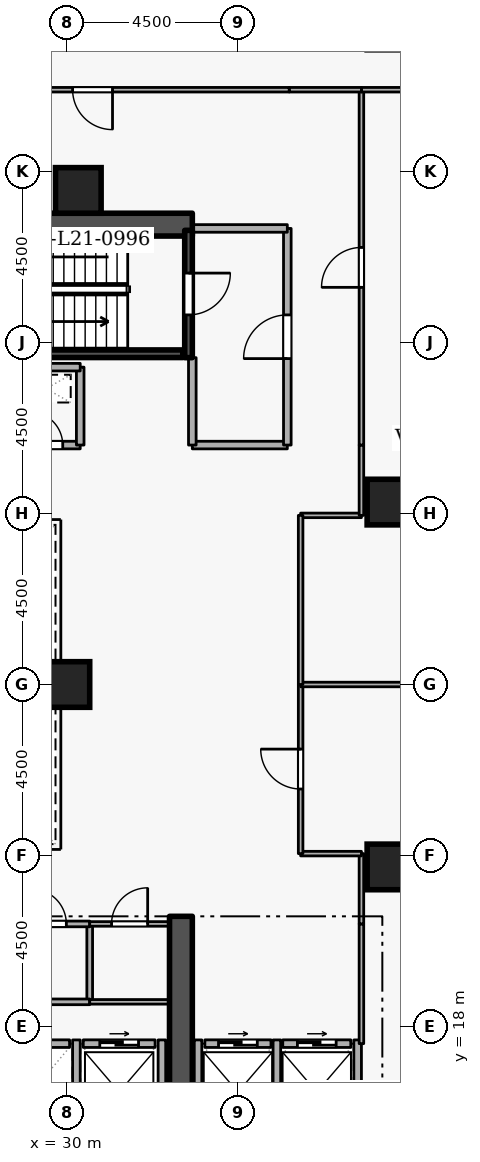
"""IFC4 building model, lengths in metres.
Left out: names, types, materials, properties, quantities, classifications, styles, units other than length and angle.
Written with IfcOpenShell. Run it as: python <this file> out.ifc"""

import sys

from ifc_helpers import new_model, si_unit, direction, frame, frame_2d, origin, origin_2d, place, context, subcontext, project, spatial, rectangle, extrude, element, fill, save


model = new_model("IFC4")
c1 = context("Model", 3, precision=1e-05, world=origin(), true_north=direction((0.0, 1.0)))
c2 = subcontext(c1, "Body", "Model", "MODEL_VIEW")
j1 = project(units=[si_unit("LENGTHUNIT", "METRE"), si_unit("PLANEANGLEUNIT", "RADIAN")], contexts=[c1])
p1 = place(None, origin())
s1 = spatial("IfcSite", under=j1, at=p1, CompositionType="ELEMENT")
p2 = place(p1, origin())
s2 = spatial("IfcBuilding", under=s1, at=p2, CompositionType="ELEMENT")
p3 = place(p2, frame((0.0, 0.0, 83.7)))
s3 = spatial("IfcBuildingStorey", under=s2, at=p3, CompositionType="ELEMENT", Elevation=83.7)
p4 = place(p3, frame((33.0, 15.2, 0.0), z_axis=(0.0, 0.0, 1.0), x_axis=(0.0, 1.0, 0.0)))
e1 = element("IfcWall", 1, at=p4, inside=s3, PredefinedType="SHEAR", context=c2, shape_type="SweptSolid", body=[
    extrude(rectangle(XDim=5.7, YDim=0.6, at=frame_2d((2.85, 0.0))), origin(), (0.0, 0.0, 1.0), 3.6),
])
p5 = place(p3, frame((17.7, 39.1, 0.0), z_axis=(0.0, 0.0, 1.0), x_axis=(1.0, 0.0, 0.0)))
e2 = element("IfcWall", 2, at=p5, inside=s3, PredefinedType="SHEAR", context=c2, shape_type="SweptSolid", body=[
    extrude(rectangle(XDim=15.6, YDim=0.6, at=frame_2d((7.8, 0.0))), origin(), (0.0, 0.0, 1.0), 3.6),
])
for number, where, z_axis, x_axis in (
    (3, (38.5, 22.2, 0.0), (0.0, 0.0, 1.0), (1.0, 0.0, 0.0)),
    (4, (38.5, 31.8, 0.0), (0.0, 0.0, 1.0), (1.0, 0.0, 0.0)),
    (5, (30.3, 40.0, 0.0), (0.0, 0.0, 1.0), (1.0, 0.0, 0.0)),
    (6, (30.0, 27.0, 0.0), (0.0, 0.0, 1.0), (1.0, 0.0, 0.0)),
):
    element("IfcColumn", number, at=place(p3, frame(where, z_axis=z_axis, x_axis=x_axis)), inside=s3, PredefinedType="COLUMN", context=c2, shape_type="SweptSolid", body=[
        extrude(rectangle(XDim=1.2, YDim=1.2, at=origin_2d()), origin(), (0.0, 0.0, 1.0), 3.6),
    ])
p6 = place(p3, frame((28.08, 17.55, 0.0), z_axis=(0.0, 0.0, 1.0), x_axis=(1.0, 0.0, 0.0)))
e7 = element("IfcWall", 7, at=p6, inside=s3, PredefinedType="STANDARD", context=c2, shape_type="SweptSolid", body=[
    extrude(rectangle(XDim=1.99, YDim=0.2, at=frame_2d((0.995, 0.0))), origin(), (0.0, 0.0, 1.0), 3.34),
])
p7 = place(p3, frame((30.43, 17.55, 0.0), z_axis=(0.0, 0.0, 1.0), x_axis=(1.0, 0.0, 0.0)))
e8 = element("IfcWall", 8, at=p7, inside=s3, PredefinedType="STANDARD", context=c2, shape_type="SweptSolid", body=[
    extrude(rectangle(XDim=1.89, YDim=0.2, at=frame_2d((0.945, 0.0))), origin(), (0.0, 0.0, 1.0), 3.34),
])
p8 = place(p7, frame((0.435, 0.0, 0.0)))
e9 = element("IfcOpeningElement", 9, at=p8, cuts=e8, PredefinedType="OPENING", context=c2, shape_type="SweptSolid", body=[
    extrude(rectangle(XDim=1.02, YDim=2.06, at=frame_2d((0.51, 1.03))), frame((0.0, 0.11, 0.0), z_axis=(0.0, -1.0, 0.0), x_axis=(1.0, 0.0, 0.0)), (0.0, 0.0, 1.0), 0.22),
])
p9 = place(p3, frame((33.63, 17.55, 0.0), z_axis=(0.0, 0.0, 1.0), x_axis=(1.0, 0.0, 0.0)))
e10 = element("IfcWall", 10, at=p9, inside=s3, PredefinedType="STANDARD", context=c2, shape_type="SweptSolid", body=[
    extrude(rectangle(XDim=1.74, YDim=0.2, at=frame_2d((0.87, 0.0))), origin(), (0.0, 0.0, 1.0), 3.34),
])
p10 = place(p9, frame((0.36, 0.0, 0.0)))
e11 = element("IfcOpeningElement", 11, at=p10, cuts=e10, PredefinedType="OPENING", context=c2, shape_type="SweptSolid", body=[
    extrude(rectangle(XDim=1.02, YDim=2.06, at=frame_2d((0.51, 1.03))), frame((0.0, 0.11, 0.0), z_axis=(0.0, -1.0, 0.0), x_axis=(1.0, 0.0, 0.0)), (0.0, 0.0, 1.0), 0.22),
])
p11 = place(p3, frame((35.68, 17.55, 0.0), z_axis=(0.0, 0.0, 1.0), x_axis=(1.0, 0.0, 0.0)))
e12 = element("IfcWall", 12, at=p11, inside=s3, PredefinedType="STANDARD", context=c2, shape_type="SweptSolid", body=[
    extrude(rectangle(XDim=1.79, YDim=0.2, at=frame_2d((0.895, 0.0))), origin(), (0.0, 0.0, 1.0), 3.34),
])
p12 = place(p11, frame((0.385, 0.0, 0.0)))
e13 = element("IfcOpeningElement", 13, at=p12, cuts=e12, PredefinedType="OPENING", context=c2, shape_type="SweptSolid", body=[
    extrude(rectangle(XDim=1.02, YDim=2.06, at=frame_2d((0.51, 1.03))), frame((0.0, 0.11, 0.0), z_axis=(0.0, -1.0, 0.0), x_axis=(1.0, 0.0, 0.0)), (0.0, 0.0, 1.0), 0.22),
])
for number, where, z_axis, x_axis in (
    (14, (30.25, 15.212, 0.0), (0.0, 0.0, 1.0), (0.0, 1.0, 0.0)),
    (15, (32.5, 15.212, 0.0), (0.0, 0.0, 1.0), (0.0, 1.0, 0.0)),
):
    element("IfcWall", number, at=place(p3, frame(where, z_axis=z_axis, x_axis=x_axis)), inside=s3, PredefinedType="STANDARD", context=c2, shape_type="SweptSolid", body=[
        extrude(rectangle(XDim=2.436, YDim=0.2, at=frame_2d((1.218, 0.0))), origin(), (0.0, 0.0, 1.0), 3.34),
    ])
for number, where, z_axis, x_axis in (
    (16, (35.525, 15.012, 0.0), (0.0, 0.0, 1.0), (0.0, 1.0, 0.0)),
    (17, (33.45, 15.012, 0.0), (0.0, 0.0, 1.0), (0.0, 1.0, 0.0)),
    (18, (37.65, 15.012, 0.0), (0.0, 0.0, 1.0), (0.0, 1.0, 0.0)),
):
    element("IfcWall", number, at=place(p3, frame(where, z_axis=z_axis, x_axis=x_axis)), inside=s3, PredefinedType="STANDARD", context=c2, shape_type="SweptSolid", body=[
        extrude(rectangle(XDim=2.636, YDim=0.2, at=frame_2d((1.318, 0.0))), origin(), (0.0, 0.0, 1.0), 3.34),
    ])
p13 = place(p3, frame((33.2, 38.95, 0.0), z_axis=(0.0, 0.0, 1.0), x_axis=(0.0, -1.0, 0.0)))
e19 = element("IfcWall", 19, at=p13, inside=s3, PredefinedType="SHEAR", context=c2, shape_type="SweptSolid", body=[
    extrude(rectangle(XDim=3.35, YDim=0.2, at=frame_2d((1.675, 0.0))), origin(), (0.0, 0.0, 1.0), 3.6),
])
p14 = place(p13, frame((1.125, 0.0, 0.0)))
e20 = element("IfcOpeningElement", 20, at=p14, cuts=e19, PredefinedType="OPENING", context=c2, shape_type="SweptSolid", body=[
    extrude(rectangle(XDim=1.1, YDim=2.1, at=frame_2d((0.55, 1.05))), frame((0.0, 0.11, 0.0), z_axis=(0.0, -1.0, 0.0), x_axis=(1.0, 0.0, 0.0)), (0.0, 0.0, 1.0), 0.22),
])
p15 = place(p3, frame((25.95, 35.703, 0.0), z_axis=(0.0, 0.0, 1.0), x_axis=(1.0, 0.0, 0.0)))
e21 = element("IfcWall", 21, at=p15, inside=s3, PredefinedType="SHEAR", context=c2, shape_type="SweptSolid", body=[
    extrude(rectangle(XDim=7.1, YDim=0.2, at=frame_2d((3.55, 0.0))), origin(), (0.0, 0.0, 1.0), 3.6),
])
p16 = place(p3, frame((33.3, 33.3, 0.0), z_axis=(0.0, 0.0, 1.0), x_axis=(1.0, 0.0, 0.0)))
e22 = element("IfcWall", 22, at=p16, inside=s3, PredefinedType="STANDARD", context=c2, shape_type="SweptSolid", body=[
    extrude(rectangle(XDim=2.5, YDim=0.2, at=frame_2d((1.25, 0.0))), origin(), (0.0, 0.0, 1.0), 3.34),
])
p17 = place(p3, frame((35.8, 33.3, 0.0), z_axis=(0.0, 0.0, 1.0), x_axis=(0.0, 1.0, 0.0)))
e23 = element("IfcWall", 23, at=p17, inside=s3, PredefinedType="STANDARD", context=c2, shape_type="SweptSolid", body=[
    extrude(rectangle(XDim=5.7, YDim=0.2, at=frame_2d((2.85, 0.0))), origin(), (0.0, 0.0, 1.0), 3.34),
])
p18 = place(p17, frame((2.275, 0.0, 0.0)))
e24 = element("IfcOpeningElement", 24, at=p18, cuts=e23, PredefinedType="OPENING", context=c2, shape_type="SweptSolid", body=[
    extrude(rectangle(XDim=1.15, YDim=2.1, at=frame_2d((0.575, 1.05))), frame((0.0, 0.11, 0.0), z_axis=(0.0, -1.0, 0.0), x_axis=(1.0, 0.0, 0.0)), (0.0, 0.0, 1.0), 0.22),
])
p19 = place(p3, frame((35.8, 39.0, 0.0), z_axis=(0.0, 0.0, 1.0), x_axis=(-1.0, 0.0, 0.0)))
e25 = element("IfcWall", 25, at=p19, inside=s3, PredefinedType="STANDARD", context=c2, shape_type="SweptSolid", body=[
    extrude(rectangle(XDim=2.5, YDim=0.2, at=frame_2d((1.25, 0.0))), origin(), (0.0, 0.0, 1.0), 3.34),
])
p20 = place(p3, frame((33.3, 35.6, 0.0), z_axis=(0.0, 0.0, 1.0), x_axis=(0.0, -1.0, 0.0)))
e26 = element("IfcWall", 26, at=p20, inside=s3, PredefinedType="STANDARD", context=c2, shape_type="SweptSolid", body=[
    extrude(rectangle(XDim=2.3, YDim=0.2, at=frame_2d((1.15, 0.0))), origin(), (0.0, 0.0, 1.0), 2.545),
])
p21 = place(p3, frame((28.55, 33.3, 0.0), z_axis=(0.0, 0.0, 1.0), x_axis=(1.0, 0.0, 0.0)))
e27 = element("IfcWall", 27, at=p21, inside=s3, PredefinedType="STANDARD", context=c2, shape_type="SweptSolid", body=[
    extrude(rectangle(XDim=1.8, YDim=0.2, at=frame_2d((0.9, 0.0))), origin(), (0.0, 0.0, 1.0), 3.34),
])
p22 = place(p21, frame((0.46, 0.0, 0.0)))
e28 = element("IfcOpeningElement", 28, at=p22, cuts=e27, PredefinedType="OPENING", context=c2, shape_type="SweptSolid", body=[
    extrude(rectangle(XDim=0.88, YDim=2.04, at=frame_2d((0.44, 1.02))), frame((0.0, 0.11, 0.0), z_axis=(0.0, -1.0, 0.0), x_axis=(1.0, 0.0, 0.0)), (0.0, 0.0, 1.0), 0.22),
])
p23 = place(p3, frame((30.35, 33.3, 0.0), z_axis=(0.0, 0.0, 1.0), x_axis=(0.0, 1.0, 0.0)))
e29 = element("IfcWall", 29, at=p23, inside=s3, PredefinedType="STANDARD", context=c2, shape_type="SweptSolid", body=[
    extrude(rectangle(XDim=2.05, YDim=0.2, at=frame_2d((1.025, 0.0))), origin(), (0.0, 0.0, 1.0), 3.34),
])
p24 = place(p3, frame((30.35, 35.35, 0.0), z_axis=(0.0, 0.0, 1.0), x_axis=(-1.0, 0.0, 0.0)))
e30 = element("IfcWall", 30, at=p24, inside=s3, PredefinedType="STANDARD", context=c2, shape_type="SweptSolid", body=[
    extrude(rectangle(XDim=1.8, YDim=0.2, at=frame_2d((0.9, 0.0))), origin(), (0.0, 0.0, 1.0), 3.34),
])
p25 = place(p3, frame((30.6, 20.7, 0.0), z_axis=(0.0, 0.0, 1.0), x_axis=(0.0, -1.0, 0.0)))
e31 = element("IfcWall", 31, at=p25, inside=s3, PredefinedType="PARTITIONING", context=c2, shape_type="SweptSolid", body=[
    extrude(rectangle(XDim=2.05, YDim=0.15, at=frame_2d((1.025, 0.0))), origin(), (0.0, 0.0, 1.0), 3.34),
])
p26 = place(p3, frame((30.6, 18.65, 0.0), z_axis=(0.0, 0.0, 1.0), x_axis=(-1.0, 0.0, 0.0)))
e32 = element("IfcWall", 32, at=p26, inside=s3, PredefinedType="PARTITIONING", context=c2, shape_type="SweptSolid", body=[
    extrude(rectangle(XDim=2.15, YDim=0.15, at=frame_2d((1.075, 0.0))), origin(), (0.0, 0.0, 1.0), 3.34),
])
p27 = place(p3, frame((28.45, 20.7, 0.0), z_axis=(0.0, 0.0, 1.0), x_axis=(1.0, 0.0, 0.0)))
e33 = element("IfcWall", 33, at=p27, inside=s3, PredefinedType="PARTITIONING", context=c2, shape_type="SweptSolid", body=[
    extrude(rectangle(XDim=2.15, YDim=0.15, at=frame_2d((1.075, 0.0))), origin(), (0.0, 0.0, 1.0), 3.34),
])
p28 = place(p27, frame((0.615, 0.0, 0.0)))
e34 = element("IfcOpeningElement", 34, at=p28, cuts=e33, PredefinedType="OPENING", context=c2, shape_type="SweptSolid", body=[
    extrude(rectangle(XDim=0.92, YDim=2.08, at=frame_2d((0.46, 1.04))), frame((0.0, 0.085, 0.0), z_axis=(0.0, -1.0, 0.0), x_axis=(1.0, 0.0, 0.0)), (0.0, 0.0, 1.0), 0.17),
])
p29 = place(p3, frame((32.7, 18.65, 0.0), z_axis=(0.0, 0.0, 1.0), x_axis=(-1.0, 0.0, 0.0)))
e35 = element("IfcWall", 35, at=p29, inside=s3, PredefinedType="PARTITIONING", context=c2, shape_type="SweptSolid", body=[
    extrude(rectangle(XDim=2.1, YDim=0.12, at=frame_2d((1.05, 0.0))), origin(), (0.0, 0.0, 1.0), 3.34),
])
p30 = place(p3, frame((30.6, 20.7, 0.0), z_axis=(0.0, 0.0, 1.0), x_axis=(1.0, 0.0, 0.0)))
e36 = element("IfcWall", 36, at=p30, inside=s3, PredefinedType="PARTITIONING", context=c2, shape_type="SweptSolid", body=[
    extrude(rectangle(XDim=2.1, YDim=0.12, at=frame_2d((1.05, 0.0))), origin(), (0.0, 0.0, 1.0), 3.34),
])
p31 = place(p30, frame((0.575, 0.0, 0.0)))
e37 = element("IfcOpeningElement", 37, at=p31, cuts=e36, PredefinedType="OPENING", context=c2, shape_type="SweptSolid", body=[
    extrude(rectangle(XDim=0.95, YDim=2.1, at=frame_2d((0.475, 1.05))), frame((0.0, 0.07, 0.0), z_axis=(0.0, -1.0, 0.0), x_axis=(1.0, 0.0, 0.0)), (0.0, 0.0, 1.0), 0.14),
])
p32 = place(p3, frame((37.75, 17.55, 0.0), z_axis=(0.0, 0.0, 1.0), x_axis=(0.0, 1.0, 0.0)))
e38 = element("IfcWall", 38, at=p32, inside=s3, PredefinedType="PARTITIONING", context=c2, shape_type="SweptSolid", body=[
    extrude(rectangle(XDim=3.15, YDim=0.12, at=frame_2d((1.575, 0.0))), origin(), (0.0, 0.0, 1.0), 3.34),
])
p33 = place(p3, frame((37.75, 20.7, 0.0), z_axis=(0.0, 0.0, 1.0), x_axis=(0.0, 1.0, 0.0)))
e39 = element("IfcWall", 39, at=p33, inside=s3, PredefinedType="PARTITIONING", context=c2, shape_type="SweptSolid", body=[
    extrude(rectangle(XDim=1.85, YDim=0.12, at=frame_2d((0.925, 0.0))), origin(), (0.0, 0.0, 1.0), 3.34),
])
p34 = place(p3, frame((37.75, 22.55, 0.0), z_axis=(0.0, 0.0, 1.0), x_axis=(-1.0, 0.0, 0.0)))
e40 = element("IfcWall", 40, at=p34, inside=s3, PredefinedType="PARTITIONING", context=c2, shape_type="SweptSolid", body=[
    extrude(rectangle(XDim=1.6, YDim=0.12, at=frame_2d((0.8, 0.0))), origin(), (0.0, 0.0, 1.0), 3.34),
])
p35 = place(p3, frame((36.15, 22.55, 0.0), z_axis=(0.0, 0.0, 1.0), x_axis=(0.0, 1.0, 0.0)))
e41 = element("IfcWall", 41, at=p35, inside=s3, PredefinedType="PARTITIONING", context=c2, shape_type="SweptSolid", body=[
    extrude(rectangle(XDim=4.45, YDim=0.12, at=frame_2d((2.225, 0.0))), origin(), (0.0, 0.0, 1.0), 3.34),
])
p36 = place(p35, frame((1.7, 0.0, 0.0)))
e42 = element("IfcOpeningElement", 42, at=p36, cuts=e41, PredefinedType="OPENING", context=c2, shape_type="SweptSolid", body=[
    extrude(rectangle(XDim=1.05, YDim=2.1, at=frame_2d((0.525, 1.05))), frame((0.0, 0.07, 0.0), z_axis=(0.0, -1.0, 0.0), x_axis=(1.0, 0.0, 0.0)), (0.0, 0.0, 1.0), 0.14),
])
p37 = place(p3, frame((36.15, 27.0, 0.0), z_axis=(0.0, 0.0, 1.0), x_axis=(1.0, 0.0, 0.0)))
e43 = element("IfcWall", 43, at=p37, inside=s3, PredefinedType="PARTITIONING", context=c2, shape_type="SweptSolid", body=[
    extrude(rectangle(XDim=13.27, YDim=0.12, at=frame_2d((6.635, 0.0))), origin(), (0.0, 0.0, 1.0), 2.882),
])
p38 = place(p3, frame((36.15, 31.45, 0.0), z_axis=(0.0, 0.0, 1.0), x_axis=(1.0, 0.0, 0.0)))
e44 = element("IfcWall", 44, at=p38, inside=s3, PredefinedType="PARTITIONING", context=c2, shape_type="SweptSolid", body=[
    extrude(rectangle(XDim=1.6, YDim=0.12, at=frame_2d((0.8, 0.0))), origin(), (0.0, 0.0, 1.0), 3.34),
])
p39 = place(p3, frame((37.75, 31.45, 0.0), z_axis=(0.0, 0.0, 1.0), x_axis=(0.0, 1.0, 0.0)))
e45 = element("IfcWall", 45, at=p39, inside=s3, PredefinedType="PARTITIONING", context=c2, shape_type="SweptSolid", body=[
    extrude(rectangle(XDim=1.85, YDim=0.12, at=frame_2d((0.925, 0.0))), origin(), (0.0, 0.0, 1.0), 3.34),
])
p40 = place(p3, frame((37.75, 33.3, 0.0), z_axis=(0.0, 0.0, 1.0), x_axis=(0.0, 1.0, 0.0)))
e46 = element("IfcWall", 46, at=p40, inside=s3, PredefinedType="PARTITIONING", context=c2, shape_type="SweptSolid", body=[
    extrude(rectangle(XDim=9.35, YDim=0.12, at=frame_2d((4.675, 0.0))), origin(), (0.0, 0.0, 1.0), 3.34),
])
p41 = place(p40, frame((4.15, 0.0, 0.0)))
e47 = element("IfcOpeningElement", 47, at=p41, cuts=e46, PredefinedType="OPENING", context=c2, shape_type="SweptSolid", body=[
    extrude(rectangle(XDim=1.05, YDim=2.1, at=frame_2d((0.525, 1.05))), frame((0.0, 0.07, 0.0), z_axis=(0.0, -1.0, 0.0), x_axis=(1.0, 0.0, 0.0)), (0.0, 0.0, 1.0), 0.14),
])
p42 = place(p3, frame((37.75, 42.65, 0.0), z_axis=(0.0, 0.0, 1.0), x_axis=(1.0, 0.0, 0.0)))
e48 = element("IfcWall", 48, at=p42, inside=s3, PredefinedType="PARTITIONING", context=c2, shape_type="SweptSolid", body=[
    extrude(rectangle(XDim=11.67, YDim=0.12, at=frame_2d((5.835, 0.0))), origin(), (0.0, 0.0, 1.0), 3.34),
])
p43 = place(p3, frame((36.15, 27.0, 0.0), z_axis=(0.0, 0.0, 1.0), x_axis=(0.0, 1.0, 0.0)))
e49 = element("IfcWall", 49, at=p43, inside=s3, PredefinedType="PARTITIONING", context=c2, shape_type="SweptSolid", body=[
    extrude(rectangle(XDim=4.45, YDim=0.12, at=frame_2d((2.225, 0.0))), origin(), (0.0, 0.0, 1.0), 3.34),
])
p44 = place(p3, frame((37.75, 42.65, 0.0), z_axis=(0.0, 0.0, 1.0), x_axis=(-1.0, 0.0, 0.0)))
e50 = element("IfcWall", 50, at=p44, inside=s3, PredefinedType="PARTITIONING", context=c2, shape_type="SweptSolid", body=[
    extrude(rectangle(XDim=1.9, YDim=0.12, at=frame_2d((0.95, 0.0))), origin(), (0.0, 0.0, 1.0), 2.895),
])
p45 = place(p3, frame((35.85, 42.65, 0.0), z_axis=(0.0, 0.0, 1.0), x_axis=(-1.0, 0.0, 0.0)))
e51 = element("IfcWall", 51, at=p45, inside=s3, PredefinedType="PARTITIONING", context=c2, shape_type="SweptSolid", body=[
    extrude(rectangle(XDim=10.35, YDim=0.12, at=frame_2d((5.175, 0.0))), origin(), (0.0, 0.0, 1.0), 2.895),
])
p46 = place(p45, frame((4.65, 0.0, 0.0)))
e52 = element("IfcOpeningElement", 52, at=p46, cuts=e51, PredefinedType="OPENING", context=c2, shape_type="SweptSolid", body=[
    extrude(rectangle(XDim=1.05, YDim=2.1, at=frame_2d((0.525, 1.05))), frame((0.0, 0.07, 0.0), z_axis=(0.0, -1.0, 0.0), x_axis=(1.0, 0.0, 0.0)), (0.0, 0.0, 1.0), 0.14),
])
p47 = place(p8, origin())
e53 = element("IfcDoor", 53, at=p47, inside=s3, OperationType="SLIDING_TO_LEFT", PredefinedType="DOOR", context=c2, shape_type="SweptSolid", body=[
    extrude(rectangle(XDim=1.02, YDim=2.06, at=frame_2d((0.51, 1.03))), frame((0.0, 0.025, 0.0), z_axis=(0.0, -1.0, 0.0), x_axis=(1.0, 0.0, 0.0)), (0.0, 0.0, 1.0), 0.05),
])
fill(e9, e53)
p48 = place(p10, origin())
e54 = element("IfcDoor", 54, at=p48, inside=s3, OperationType="SLIDING_TO_LEFT", PredefinedType="DOOR", context=c2, shape_type="SweptSolid", body=[
    extrude(rectangle(XDim=1.02, YDim=2.06, at=frame_2d((0.51, 1.03))), frame((0.0, 0.025, 0.0), z_axis=(0.0, -1.0, 0.0), x_axis=(1.0, 0.0, 0.0)), (0.0, 0.0, 1.0), 0.05),
])
fill(e11, e54)
p49 = place(p12, origin())
e55 = element("IfcDoor", 55, at=p49, inside=s3, OperationType="SLIDING_TO_LEFT", PredefinedType="DOOR", context=c2, shape_type="SweptSolid", body=[
    extrude(rectangle(XDim=1.02, YDim=2.06, at=frame_2d((0.51, 1.03))), frame((0.0, 0.025, 0.0), z_axis=(0.0, -1.0, 0.0), x_axis=(1.0, 0.0, 0.0)), (0.0, 0.0, 1.0), 0.05),
])
fill(e13, e55)
p50 = place(p14, origin())
e56 = element("IfcDoor", 56, at=p50, inside=s3, OperationType="SINGLE_SWING_LEFT", PredefinedType="DOOR", context=c2, shape_type="SweptSolid", body=[
    extrude(rectangle(XDim=1.1, YDim=2.1, at=frame_2d((0.55, 1.05))), frame((0.0, 0.025, 0.0), z_axis=(0.0, -1.0, 0.0), x_axis=(1.0, 0.0, 0.0)), (0.0, 0.0, 1.0), 0.05),
])
fill(e20, e56)
p51 = place(p18, origin())
e57 = element("IfcDoor", 57, at=p51, inside=s3, OperationType="SINGLE_SWING_LEFT", PredefinedType="DOOR", context=c2, shape_type="SweptSolid", body=[
    extrude(rectangle(XDim=1.15, YDim=2.1, at=frame_2d((0.575, 1.05))), frame((0.0, 0.025, 0.0), z_axis=(0.0, -1.0, 0.0), x_axis=(1.0, 0.0, 0.0)), (0.0, 0.0, 1.0), 0.05),
])
fill(e24, e57)
p52 = place(p22, origin())
e58 = element("IfcDoor", 58, at=p52, inside=s3, OperationType="SINGLE_SWING_LEFT", PredefinedType="DOOR", context=c2, shape_type="SweptSolid", body=[
    extrude(rectangle(XDim=0.88, YDim=2.04, at=frame_2d((0.44, 1.02))), frame((0.0, 0.025, 0.0), z_axis=(0.0, -1.0, 0.0), x_axis=(1.0, 0.0, 0.0)), (0.0, 0.0, 1.0), 0.05),
])
fill(e28, e58)
p53 = place(p28, origin())
e59 = element("IfcDoor", 59, at=p53, inside=s3, OperationType="SINGLE_SWING_LEFT", PredefinedType="DOOR", context=c2, shape_type="SweptSolid", body=[
    extrude(rectangle(XDim=0.92, YDim=2.08, at=frame_2d((0.46, 1.04))), frame((0.0, 0.025, 0.0), z_axis=(0.0, -1.0, 0.0), x_axis=(1.0, 0.0, 0.0)), (0.0, 0.0, 1.0), 0.05),
])
fill(e34, e59)
p54 = place(p31, origin())
e60 = element("IfcDoor", 60, at=p54, inside=s3, OperationType="SINGLE_SWING_RIGHT", PredefinedType="DOOR", context=c2, shape_type="SweptSolid", body=[
    extrude(rectangle(XDim=0.95, YDim=2.1, at=frame_2d((0.475, 1.05))), frame((0.0, 0.025, 0.0), z_axis=(0.0, -1.0, 0.0), x_axis=(1.0, 0.0, 0.0)), (0.0, 0.0, 1.0), 0.05),
])
fill(e37, e60)
p55 = place(p36, origin())
e61 = element("IfcDoor", 61, at=p55, inside=s3, OperationType="SINGLE_SWING_RIGHT", PredefinedType="DOOR", context=c2, shape_type="SweptSolid", body=[
    extrude(rectangle(XDim=1.05, YDim=2.1, at=frame_2d((0.525, 1.05))), frame((0.0, 0.025, 0.0), z_axis=(0.0, -1.0, 0.0), x_axis=(1.0, 0.0, 0.0)), (0.0, 0.0, 1.0), 0.05),
])
fill(e42, e61)
p56 = place(p41, origin())
e62 = element("IfcDoor", 62, at=p56, inside=s3, OperationType="SINGLE_SWING_LEFT", PredefinedType="DOOR", context=c2, shape_type="SweptSolid", body=[
    extrude(rectangle(XDim=1.05, YDim=2.1, at=frame_2d((0.525, 1.05))), frame((0.0, 0.025, 0.0), z_axis=(0.0, -1.0, 0.0), x_axis=(1.0, 0.0, 0.0)), (0.0, 0.0, 1.0), 0.05),
])
fill(e47, e62)
p57 = place(p46, origin())
e63 = element("IfcDoor", 63, at=p57, inside=s3, OperationType="SINGLE_SWING_LEFT", PredefinedType="DOOR", context=c2, shape_type="SweptSolid", body=[
    extrude(rectangle(XDim=1.05, YDim=2.1, at=frame_2d((0.525, 1.05))), frame((0.0, 0.025, 0.0), z_axis=(0.0, -1.0, 0.0), x_axis=(1.0, 0.0, 0.0)), (0.0, 0.0, 1.0), 0.05),
])
fill(e52, e63)
save(model, sys.argv[1])
